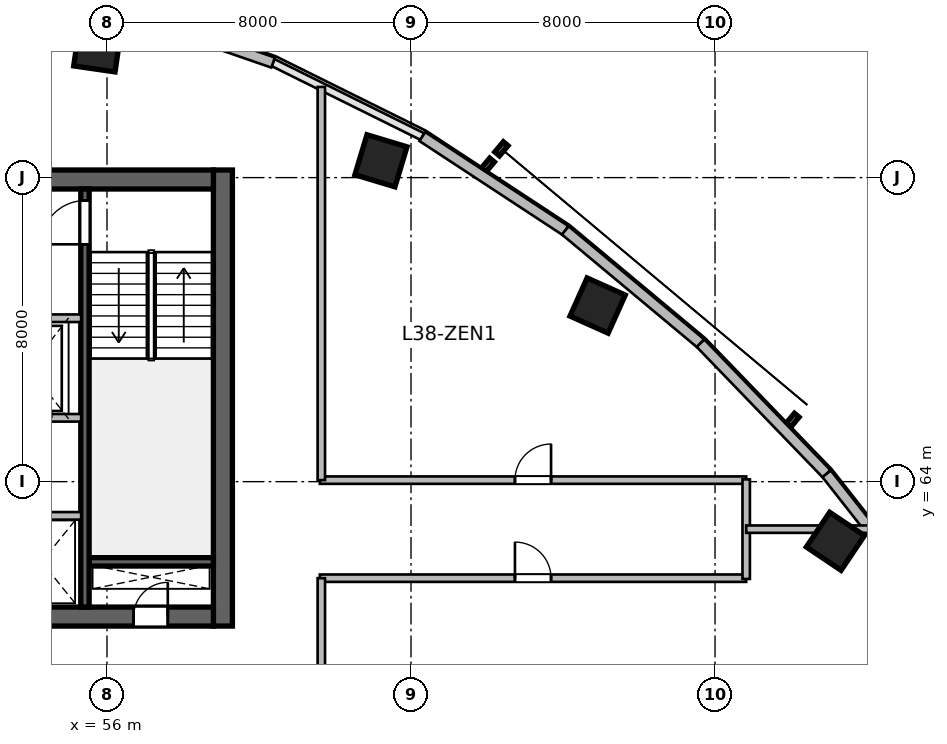
"""IFC4 building model, lengths in metres.
Left out: names, types, materials, properties, quantities, classifications, styles, units other than length and angle.
Written with IfcOpenShell. Run it as: python <this file> out.ifc"""

import sys

from ifc_helpers import new_model, si_unit, direction, frame, frame_2d, origin, origin_2d, place, context, subcontext, project, spatial, rectangle, extrude, source, transform, mapped, element, fill, save


model = new_model("IFC4")
c1 = context("Model", 3, precision=1e-05, world=origin(), true_north=direction((0.0, 1.0)))
c2 = subcontext(c1, "Body", "Model", "MODEL_VIEW")
j1 = project(units=[si_unit("LENGTHUNIT", "METRE"), si_unit("PLANEANGLEUNIT", "RADIAN")], contexts=[c1])
p1 = place(None, origin())
s1 = spatial("IfcSite", under=j1, at=p1, CompositionType="ELEMENT")
p2 = place(p1, origin())
s2 = spatial("IfcBuilding", under=s1, at=p2, CompositionType="ELEMENT")
p3 = place(p2, frame((0.0, 0.0, 158.4)))
s3 = spatial("IfcBuildingStorey", under=s2, at=p3, CompositionType="ELEMENT", Elevation=158.4)
m1 = source(origin(), c2, "Body", "SweptSolid", [
    extrude(rectangle(XDim=12.0, YDim=0.5, at=frame_2d((6.0, 0.0))), origin(), (0.0, 0.0, 1.0), 3.9),
])
p4 = place(p3, frame((59.05, 60.2, 0.0), z_axis=(0.0, 0.0, 1.0), x_axis=(0.0, 1.0, 0.0)))
e1 = element("IfcWall", 1, at=p4, inside=s3, PredefinedType="SHEAR", context=c2, shape_type="MappedRepresentation", body=[
    mapped(m1, transform((0.0, 0.0, 0.0), scale=1.0)),
])
m2 = source(origin(), c2, "Body", "SweptSolid", [
    extrude(rectangle(XDim=21.6, YDim=0.5, at=frame_2d((10.8, 0.0))), origin(), (0.0, 0.0, 1.0), 3.9),
])
p5 = place(p3, frame((37.2, 60.45, 0.0), z_axis=(0.0, 0.0, 1.0), x_axis=(1.0, 0.0, 0.0)))
e2 = element("IfcWall", 2, at=p5, inside=s3, PredefinedType="SHEAR", context=c2, shape_type="MappedRepresentation", body=[
    mapped(m2, transform((0.0, 0.0, 0.0), scale=1.0)),
])
p6 = place(p5, frame((1.1, 0.0, 0.0)))
e3 = element("IfcOpeningElement", 3, at=p6, cuts=e2, PredefinedType="OPENING", context=c2, shape_type="SweptSolid", body=[
    extrude(rectangle(XDim=1.15, YDim=2.15, at=frame_2d((0.575, 1.075))), frame((0.0, 0.26, 0.0), z_axis=(0.0, -1.0, 0.0), x_axis=(1.0, 0.0, 0.0)), (0.0, 0.0, 1.0), 0.52),
])
p7 = place(p5, frame((19.5, 0.0, 0.0)))
e4 = element("IfcOpeningElement", 4, at=p7, cuts=e2, PredefinedType="OPENING", context=c2, shape_type="SweptSolid", body=[
    extrude(rectangle(XDim=0.9, YDim=2.1, at=frame_2d((0.45, 1.05))), frame((0.0, 0.26, 0.0), z_axis=(0.0, -1.0, 0.0), x_axis=(1.0, 0.0, 0.0)), (0.0, 0.0, 1.0), 0.52),
])
p8 = place(p5, frame((12.02, 0.0, 0.0)))
e5 = element("IfcOpeningElement", 5, at=p8, cuts=e2, PredefinedType="OPENING", context=c2, shape_type="SweptSolid", body=[
    extrude(rectangle(XDim=1.6, YDim=2.15, at=frame_2d((0.8, 1.075))), frame((0.0, 0.26, 0.0), z_axis=(0.0, -1.0, 0.0), x_axis=(1.0, 0.0, 0.0)), (0.0, 0.0, 1.0), 0.52),
])
p9 = place(p3, frame((37.2, 71.95, 0.0), z_axis=(0.0, 0.0, 1.0), x_axis=(1.0, 0.0, 0.0)))
e6 = element("IfcWall", 6, at=p9, inside=s3, PredefinedType="SHEAR", context=c2, shape_type="MappedRepresentation", body=[
    mapped(m2, transform((0.0, 0.0, 0.0), scale=1.0)),
])
p10 = place(p9, frame((1.2, 0.0, 0.0)))
e7 = element("IfcOpeningElement", 7, at=p10, cuts=e6, PredefinedType="OPENING", context=c2, shape_type="SweptSolid", body=[
    extrude(rectangle(XDim=0.9, YDim=2.1, at=frame_2d((0.45, 1.05))), frame((0.0, 0.26, 0.0), z_axis=(0.0, -1.0, 0.0), x_axis=(1.0, 0.0, 0.0)), (0.0, 0.0, 1.0), 0.52),
])
p11 = place(p9, frame((14.7, 0.0, 0.0)))
e8 = element("IfcOpeningElement", 8, at=p11, cuts=e6, PredefinedType="OPENING", context=c2, shape_type="SweptSolid", body=[
    extrude(rectangle(XDim=1.2, YDim=2.15, at=frame_2d((0.6, 1.075))), frame((0.0, 0.26, 0.0), z_axis=(0.0, -1.0, 0.0), x_axis=(1.0, 0.0, 0.0)), (0.0, 0.0, 1.0), 0.52),
])
p12 = place(p9, frame((4.15, 0.0, 0.0)))
e9 = element("IfcOpeningElement", 9, at=p12, cuts=e6, PredefinedType="OPENING", context=c2, shape_type="SweptSolid", body=[
    extrude(rectangle(XDim=1.3, YDim=2.15, at=frame_2d((0.65, 1.075))), frame((0.0, 0.26, 0.0), z_axis=(0.0, -1.0, 0.0), x_axis=(1.0, 0.0, 0.0)), (0.0, 0.0, 1.0), 0.52),
])
p13 = place(p9, frame((7.1, 0.0, 0.0)))
e10 = element("IfcOpeningElement", 10, at=p13, cuts=e6, PredefinedType="OPENING", context=c2, shape_type="SweptSolid", body=[
    extrude(rectangle(XDim=0.9, YDim=2.1, at=frame_2d((0.45, 1.05))), frame((0.0, 0.26, 0.0), z_axis=(0.0, -1.0, 0.0), x_axis=(1.0, 0.0, 0.0)), (0.0, 0.0, 1.0), 0.52),
])
m3 = source(origin(), c2, "Body", "SweptSolid", [
    extrude(rectangle(XDim=3.27, YDim=0.22, at=frame_2d((1.635, 0.0))), origin(), (0.0, 0.0, 1.0), 3.9),
])
p14 = place(p3, frame((55.53, 61.89, 0.0), z_axis=(0.0, 0.0, 1.0), x_axis=(1.0, 0.0, 0.0)))
e11 = element("IfcWall", 11, at=p14, inside=s3, PredefinedType="SHEAR", context=c2, shape_type="MappedRepresentation", body=[
    mapped(m3, transform((0.0, 0.0, 0.0), scale=1.0)),
])
m4 = source(origin(), c2, "Body", "SweptSolid", [
    extrude(rectangle(XDim=11.0, YDim=0.22, at=frame_2d((5.5, 0.0))), origin(), (0.0, 0.0, 1.0), 3.9),
])
p15 = place(p3, frame((55.42, 60.7, 0.0), z_axis=(0.0, 0.0, 1.0), x_axis=(0.0, 1.0, 0.0)))
e12 = element("IfcWall", 12, at=p15, inside=s3, PredefinedType="SHEAR", context=c2, shape_type="MappedRepresentation", body=[
    mapped(m4, transform((0.0, 0.0, 0.0), scale=1.0)),
])
p16 = place(p15, frame((9.545, 0.0, 0.0)))
e13 = element("IfcOpeningElement", 13, at=p16, cuts=e12, PredefinedType="OPENING", context=c2, shape_type="SweptSolid", body=[
    extrude(rectangle(XDim=1.15, YDim=2.15, at=frame_2d((0.575, 1.075))), frame((0.0, 0.12, 0.0), z_axis=(0.0, -1.0, 0.0), x_axis=(1.0, 0.0, 0.0)), (0.0, 0.0, 1.0), 0.24),
])
m5 = source(origin(), c2, "Body", "SweptSolid", [
    extrude(rectangle(XDim=1.1, YDim=1.1, at=origin_2d()), origin(), (0.0, 0.0, 1.0), 3.9),
])
for number, where, z_axis, x_axis in (
    (14, (55.747, 75.404, 0.0), (0.0, 0.0, 1.0), (0.143, 0.99, 0.0)),
    (15, (63.209, 72.442, 0.0), (0.0, 0.0, 1.0), (0.289, 0.957, 0.0)),
    (16, (68.91, 68.633, 0.0), (0.0, 0.0, 1.0), (0.409, 0.912, 0.0)),
    (17, (75.167, 62.43, 0.0), (0.0, 0.0, 1.0), (0.558, 0.83, 0.0)),
):
    element("IfcColumn", number, at=place(p3, frame(where, z_axis=z_axis, x_axis=x_axis)), inside=s3, PredefinedType="COLUMN", context=c2, shape_type="MappedRepresentation", body=[
        mapped(m5, transform((0.0, 0.0, 0.0), scale=1.0)),
    ])
m6 = source(origin(), c2, "Body", "SweptSolid", [
    extrude(rectangle(XDim=4.29, YDim=0.28, at=frame_2d((2.145, 0.0))), origin(), (0.0, 0.0, 1.0), 3.65),
])
p17 = place(p3, frame((56.317, 76.431, 0.0), z_axis=(0.0, 0.0, 1.0), x_axis=(0.944883859218, -0.3274057003, 0.0)))
e18 = element("IfcWall", 18, at=p17, inside=s3, PredefinedType="SOLIDWALL", context=c2, shape_type="MappedRepresentation", body=[
    mapped(m6, transform((0.0, 0.0, 0.0), scale=1.0)),
])
m7 = source(origin(), c2, "Body", "SweptSolid", [
    extrude(rectangle(XDim=4.501, YDim=0.28, at=frame_2d((2.25, 0.0))), origin(), (0.0, 0.0, 1.0), 3.65),
])
p18 = place(p3, frame((64.298, 73.08, 0.0), z_axis=(0.0, 0.0, 1.0), x_axis=(0.835984920737, -0.548752414391, 0.0)))
e19 = element("IfcWall", 19, at=p18, inside=s3, PredefinedType="SOLIDWALL", context=c2, shape_type="MappedRepresentation", body=[
    mapped(m7, transform((0.0, 0.0, 0.0), scale=1.0)),
])
m8 = source(origin(), c2, "Body", "SweptSolid", [
    extrude(rectangle(XDim=4.634, YDim=0.28, at=frame_2d((2.317, 0.0))), origin(), (0.0, 0.0, 1.0), 3.65),
])
p19 = place(p3, frame((68.061, 70.61, 0.0), z_axis=(0.0, 0.0, 1.0), x_axis=(0.767910229096, -0.640557475993, 0.0)))
e20 = element("IfcWall", 20, at=p19, inside=s3, PredefinedType="SOLIDWALL", context=c2, shape_type="MappedRepresentation", body=[
    mapped(m8, transform((0.0, 0.0, 0.0), scale=1.0)),
])
m9 = source(origin(), c2, "Body", "SweptSolid", [
    extrude(rectangle(XDim=4.776, YDim=0.28, at=frame_2d((2.388, 0.0))), origin(), (0.0, 0.0, 1.0), 3.65),
])
p20 = place(p3, frame((71.619, 67.642, 0.0), z_axis=(0.0, 0.0, 1.0), x_axis=(0.694601811851, -0.719394414055, 0.0)))
e21 = element("IfcWall", 21, at=p20, inside=s3, PredefinedType="SOLIDWALL", context=c2, shape_type="MappedRepresentation", body=[
    mapped(m9, transform((0.0, 0.0, 0.0), scale=1.0)),
])
m10 = source(origin(), c2, "Body", "SweptSolid", [
    extrude(rectangle(XDim=4.922, YDim=0.28, at=frame_2d((2.461, 0.0))), origin(), (0.0, 0.0, 1.0), 3.65),
])
p21 = place(p3, frame((74.936, 64.206, 0.0), z_axis=(0.0, 0.0, 1.0), x_axis=(0.61817639101, -0.786039407153, 0.0)))
e22 = element("IfcWall", 22, at=p21, inside=s3, PredefinedType="SOLIDWALL", context=c2, shape_type="MappedRepresentation", body=[
    mapped(m10, transform((0.0, 0.0, 0.0), scale=1.0)),
])
m11 = source(origin(), c2, "Body", "SweptSolid", [
    extrude(rectangle(XDim=5.62, YDim=0.2, at=frame_2d((2.81, 0.0))), origin(), (0.0, 0.0, 1.0), 3.65),
])
p22 = place(p3, frame((49.7, 68.3, 0.0), z_axis=(0.0, 0.0, 1.0), x_axis=(1.0, 0.0, 0.0)))
e23 = element("IfcWall", 23, at=p22, inside=s3, PredefinedType="SOLIDWALL", context=c2, shape_type="MappedRepresentation", body=[
    mapped(m11, transform((0.0, 0.0, 0.0), scale=1.0)),
])
p23 = place(p22, frame((1.6, 0.0, 0.0)))
e24 = element("IfcOpeningElement", 24, at=p23, cuts=e23, PredefinedType="OPENING", context=c2, shape_type="SweptSolid", body=[
    extrude(rectangle(XDim=1.1, YDim=2.15, at=frame_2d((0.55, 1.075))), frame((0.0, 0.11, 0.0), z_axis=(0.0, -1.0, 0.0), x_axis=(1.0, 0.0, 0.0)), (0.0, 0.0, 1.0), 0.22),
])
p24 = place(p22, frame((3.7, 0.0, 0.0)))
e25 = element("IfcOpeningElement", 25, at=p24, cuts=e23, PredefinedType="OPENING", context=c2, shape_type="SweptSolid", body=[
    extrude(rectangle(XDim=1.1, YDim=2.15, at=frame_2d((0.55, 1.075))), frame((0.0, 0.11, 0.0), z_axis=(0.0, -1.0, 0.0), x_axis=(1.0, 0.0, 0.0)), (0.0, 0.0, 1.0), 0.22),
])
p25 = place(p3, frame((49.7, 65.68, 0.0), z_axis=(0.0, 0.0, 1.0), x_axis=(1.0, 0.0, 0.0)))
e26 = element("IfcWall", 26, at=p25, inside=s3, PredefinedType="SOLIDWALL", context=c2, shape_type="MappedRepresentation", body=[
    mapped(m11, transform((0.0, 0.0, 0.0), scale=1.0)),
])
m12 = source(origin(), c2, "Body", "SweptSolid", [
    extrude(rectangle(XDim=4.1, YDim=0.2, at=frame_2d((2.05, 0.0))), origin(), (0.0, 0.0, 1.0), 3.65),
])
p26 = place(p3, frame((51.22, 63.1, 0.0), z_axis=(0.0, 0.0, 1.0), x_axis=(1.0, 0.0, 0.0)))
e27 = element("IfcWall", 27, at=p26, inside=s3, PredefinedType="SOLIDWALL", context=c2, shape_type="MappedRepresentation", body=[
    mapped(m12, transform((0.0, 0.0, 0.0), scale=1.0)),
])
m13 = source(origin(), c2, "Body", "SweptSolid", [
    extrude(rectangle(XDim=11.22, YDim=0.195, at=frame_2d((5.61, 0.0))), origin(), (0.0, 0.0, 1.0), 3.65),
])
p27 = place(p3, frame((61.6, 64.04, 0.0), z_axis=(0.0, 0.0, 1.0), x_axis=(1.0, 0.0, 0.0)))
e28 = element("IfcWall", 28, at=p27, inside=s3, PredefinedType="PARTITIONING", context=c2, shape_type="MappedRepresentation", body=[
    mapped(m13, transform((0.0, 0.0, 0.0), scale=1.0)),
])
p28 = place(p27, frame((5.135, 0.0, 0.0)))
e29 = element("IfcOpeningElement", 29, at=p28, cuts=e28, PredefinedType="OPENING", context=c2, shape_type="SweptSolid", body=[
    extrude(rectangle(XDim=0.95, YDim=2.1, at=frame_2d((0.475, 1.05))), frame((0.0, 0.107, 0.0), z_axis=(0.0, -1.0, 0.0), x_axis=(1.0, 0.0, 0.0)), (0.0, 0.0, 1.0), 0.215),
])
p29 = place(p3, frame((61.6, 61.46, 0.0), z_axis=(0.0, 0.0, 1.0), x_axis=(1.0, 0.0, 0.0)))
e30 = element("IfcWall", 30, at=p29, inside=s3, PredefinedType="PARTITIONING", context=c2, shape_type="MappedRepresentation", body=[
    mapped(m13, transform((0.0, 0.0, 0.0), scale=1.0)),
])
p30 = place(p29, frame((5.135, 0.0, 0.0)))
e31 = element("IfcOpeningElement", 31, at=p30, cuts=e30, PredefinedType="OPENING", context=c2, shape_type="SweptSolid", body=[
    extrude(rectangle(XDim=0.95, YDim=2.1, at=frame_2d((0.475, 1.05))), frame((0.0, 0.107, 0.0), z_axis=(0.0, -1.0, 0.0), x_axis=(1.0, 0.0, 0.0)), (0.0, 0.0, 1.0), 0.215),
])
m14 = source(origin(), c2, "Body", "SweptSolid", [
    extrude(rectangle(XDim=12.126, YDim=0.195, at=frame_2d((6.063, 0.0))), origin(), (0.0, 0.0, 1.0), 2.942),
])
p31 = place(p3, frame((61.64, 49.334, 0.0), z_axis=(0.0, 0.0, 1.0), x_axis=(0.0, 1.0, 0.0)))
e32 = element("IfcWall", 32, at=p31, inside=s3, PredefinedType="PARTITIONING", context=c2, shape_type="MappedRepresentation", body=[
    mapped(m14, transform((0.0, 0.0, 0.0), scale=1.0)),
])
m15 = source(origin(), c2, "Body", "SweptSolid", [
    extrude(rectangle(XDim=10.346, YDim=0.195, at=frame_2d((5.173, 0.0))), origin(), (0.0, 0.0, 1.0), 3.65),
])
p32 = place(p3, frame((61.64, 64.04, 0.0), z_axis=(0.0, 0.0, 1.0), x_axis=(0.0, 1.0, 0.0)))
e33 = element("IfcWall", 33, at=p32, inside=s3, PredefinedType="PARTITIONING", context=c2, shape_type="MappedRepresentation", body=[
    mapped(m15, transform((0.0, 0.0, 0.0), scale=1.0)),
])
m16 = source(origin(), c2, "Body", "SweptSolid", [
    extrude(rectangle(XDim=2.62, YDim=0.195, at=frame_2d((1.31, 0.0))), origin(), (0.0, 0.0, 1.0), 3.022),
])
p33 = place(p3, frame((72.82, 61.44, 0.0), z_axis=(0.0, 0.0, 1.0), x_axis=(0.0, 1.0, 0.0)))
e34 = element("IfcWall", 34, at=p33, inside=s3, PredefinedType="PARTITIONING", context=c2, shape_type="MappedRepresentation", body=[
    mapped(m16, transform((0.0, 0.0, 0.0), scale=1.0)),
])
m17 = source(origin(), c2, "Body", "SweptSolid", [
    extrude(rectangle(XDim=3.249, YDim=0.195, at=frame_2d((1.625, 0.0))), origin(), (0.0, 0.0, 1.0), 3.65),
])
p34 = place(p3, frame((72.82, 62.75, 0.0), z_axis=(0.0, 0.0, 1.0), x_axis=(1.0, 0.0, 0.0)))
e35 = element("IfcWall", 35, at=p34, inside=s3, PredefinedType="PARTITIONING", context=c2, shape_type="MappedRepresentation", body=[
    mapped(m17, transform((0.0, 0.0, 0.0), scale=1.0)),
])
m18 = source(origin(), c2, "Body", "SweptSolid", [
    extrude(rectangle(XDim=0.9, YDim=2.1, at=frame_2d((0.45, 1.05))), frame((0.0, 0.025, 0.0), z_axis=(0.0, -1.0, 0.0), x_axis=(1.0, 0.0, 0.0)), (0.0, 0.0, 1.0), 0.05),
])
p35 = place(p7, origin())
e36 = element("IfcDoor", 36, at=p35, inside=s3, OperationType="SINGLE_SWING_RIGHT", PredefinedType="DOOR", context=c2, shape_type="MappedRepresentation", body=[
    mapped(m18, transform((0.0, 0.0, 0.0), scale=1.0)),
])
fill(e4, e36)
m19 = source(origin(), c2, "Body", "SweptSolid", [
    extrude(rectangle(XDim=1.15, YDim=2.15, at=frame_2d((0.575, 1.075))), frame((0.0, 0.025, 0.0), z_axis=(0.0, -1.0, 0.0), x_axis=(1.0, 0.0, 0.0)), (0.0, 0.0, 1.0), 0.05),
])
p36 = place(p16, origin())
e37 = element("IfcDoor", 37, at=p36, inside=s3, OperationType="SINGLE_SWING_LEFT", PredefinedType="DOOR", context=c2, shape_type="MappedRepresentation", body=[
    mapped(m19, transform((0.0, 0.0, 0.0), scale=1.0)),
])
fill(e13, e37)
m20 = source(origin(), c2, "Body", "SweptSolid", [
    extrude(rectangle(XDim=0.95, YDim=2.1, at=frame_2d((0.475, 1.05))), frame((0.0, 0.025, 0.0), z_axis=(0.0, -1.0, 0.0), x_axis=(1.0, 0.0, 0.0)), (0.0, 0.0, 1.0), 0.05),
])
p37 = place(p28, origin())
e38 = element("IfcDoor", 38, at=p37, inside=s3, OperationType="SINGLE_SWING_RIGHT", PredefinedType="DOOR", context=c2, shape_type="MappedRepresentation", body=[
    mapped(m20, transform((0.0, 0.0, 0.0), scale=1.0)),
])
fill(e29, e38)
p38 = place(p30, origin())
e39 = element("IfcDoor", 39, at=p38, inside=s3, OperationType="SINGLE_SWING_LEFT", PredefinedType="DOOR", context=c2, shape_type="MappedRepresentation", body=[
    mapped(m20, transform((0.0, 0.0, 0.0), scale=1.0)),
])
fill(e31, e39)
save(model, sys.argv[1])
